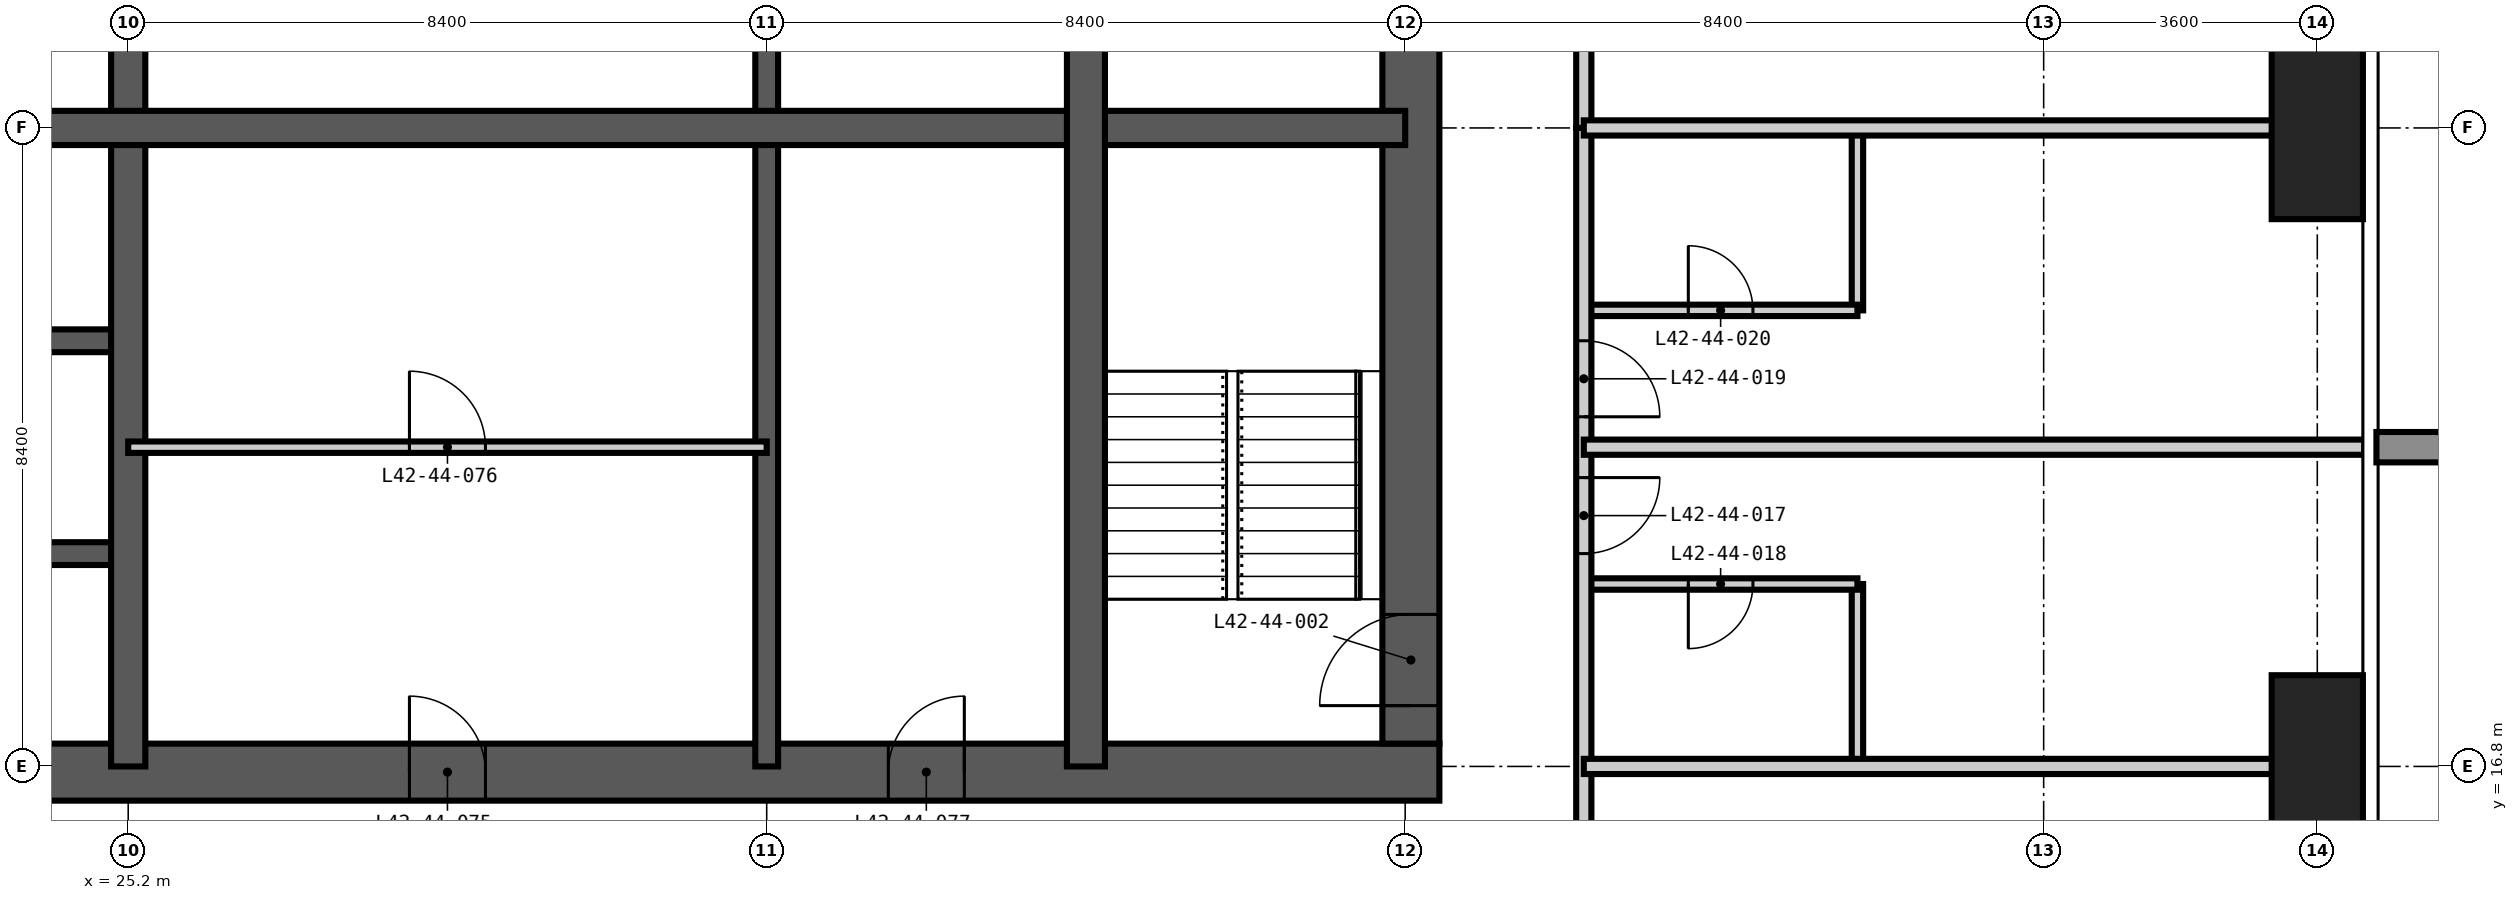
"""IFC4 building model, lengths in metres.
Left out: names, types, materials, properties, quantities, classifications, styles, units other than length and angle.
Written with IfcOpenShell. Run it as: python <this file> out.ifc"""

import sys

from ifc_helpers import new_model, si_unit, direction, frame, frame_2d, origin, origin_2d, place, context, subcontext, project, spatial, rectangle, extrude, element, fill, save


model = new_model("IFC4")
c1 = context("Model", 3, precision=1e-05, world=origin(), true_north=direction((0.0, 1.0)))
c2 = subcontext(c1, "Body", "Model", "MODEL_VIEW")
j1 = project(units=[si_unit("LENGTHUNIT", "METRE"), si_unit("PLANEANGLEUNIT", "RADIAN")], contexts=[c1])
p1 = place(None, origin())
s1 = spatial("IfcSite", under=j1, at=p1, CompositionType="ELEMENT")
p2 = place(p1, origin())
s2 = spatial("IfcBuilding", under=s1, at=p2, CompositionType="ELEMENT")
p3 = place(p2, frame((0.0, 0.0, 166.2)))
s3 = spatial("IfcBuildingStorey", under=s2, at=p3, CompositionType="ELEMENT", Elevation=166.2)
for number, where, z_axis, x_axis in (
    (1, (54.0, 16.8, -0.35), (0.0, 0.0, 1.0), (1.0, 0.0, 0.0)),
    (2, (54.0, 25.2, -0.35), (0.0, 0.0, 1.0), (1.0, 0.0, 0.0)),
):
    element("IfcColumn", number, at=place(p3, frame(where, z_axis=z_axis, x_axis=x_axis)), inside=s3, PredefinedType="COLUMN", context=c2, shape_type="SweptSolid", body=[
        extrude(rectangle(XDim=1.2, YDim=2.4, at=origin_2d()), origin(), (0.0, 0.0, 1.0), 3.6),
    ])
p4 = place(p3, frame((16.35, 16.725, -0.35), z_axis=(0.0, 0.0, 1.0), x_axis=(1.0, 0.0, 0.0)))
e3 = element("IfcWall", 3, at=p4, inside=s3, PredefinedType="SHEAR", context=c2, shape_type="SweptSolid", body=[
    extrude(rectangle(XDim=26.1, YDim=0.75, at=frame_2d((13.05, 0.0))), origin(), (0.0, 0.0, 1.0), 3.6),
])
p5 = place(p4, frame((12.55, 0.0, 0.35)))
e4 = element("IfcOpeningElement", 4, at=p5, cuts=e3, PredefinedType="OPENING", context=c2, shape_type="SweptSolid", body=[
    extrude(rectangle(XDim=1.0, YDim=2.1, at=frame_2d((0.5, 1.05))), frame((0.0, 0.385, 0.0), z_axis=(0.0, -1.0, 0.0), x_axis=(1.0, 0.0, 0.0)), (0.0, 0.0, 1.0), 0.77),
])
p6 = place(p4, frame((18.85, 0.0, 0.35)))
e5 = element("IfcOpeningElement", 5, at=p6, cuts=e3, PredefinedType="OPENING", context=c2, shape_type="SweptSolid", body=[
    extrude(rectangle(XDim=1.0, YDim=2.1, at=frame_2d((0.5, 1.05))), frame((0.0, 0.385, 0.0), z_axis=(0.0, -1.0, 0.0), x_axis=(1.0, 0.0, 0.0)), (0.0, 0.0, 1.0), 0.77),
])
p7 = place(p3, frame((42.075, 17.1, -0.35), z_axis=(0.0, 0.0, 1.0), x_axis=(0.0, 1.0, 0.0)))
e6 = element("IfcWall", 6, at=p7, inside=s3, PredefinedType="SHEAR", context=c2, shape_type="SweptSolid", body=[
    extrude(rectangle(XDim=24.6, YDim=0.75, at=frame_2d((12.3, 0.0))), origin(), (0.0, 0.0, 1.0), 3.6),
])
p8 = place(p7, frame((0.5, 0.0, 0.35)))
e7 = element("IfcOpeningElement", 7, at=p8, cuts=e6, PredefinedType="OPENING", context=c2, shape_type="SweptSolid", body=[
    extrude(rectangle(XDim=1.2, YDim=2.2, at=frame_2d((0.6, 1.1))), frame((0.0, 0.385, 0.0), z_axis=(0.0, -1.0, 0.0), x_axis=(1.0, 0.0, 0.0)), (0.0, 0.0, 1.0), 0.77),
])
p9 = place(p7, frame((11.8, 0.0, 0.35)))
e8 = element("IfcOpeningElement", 8, at=p9, cuts=e6, PredefinedType="OPENING", context=c2, shape_type="SweptSolid", body=[
    extrude(rectangle(XDim=1.0, YDim=2.1, at=frame_2d((0.5, 1.05))), frame((0.0, 0.385, 0.0), z_axis=(0.0, -1.0, 0.0), x_axis=(1.0, 0.0, 0.0)), (0.0, 0.0, 1.0), 0.77),
])
p10 = place(p7, frame((20.2, 0.0, 0.35)))
e9 = element("IfcOpeningElement", 9, at=p10, cuts=e6, PredefinedType="OPENING", context=c2, shape_type="SweptSolid", body=[
    extrude(rectangle(XDim=1.0, YDim=2.1, at=frame_2d((0.5, 1.05))), frame((0.0, 0.385, 0.0), z_axis=(0.0, -1.0, 0.0), x_axis=(1.0, 0.0, 0.0)), (0.0, 0.0, 1.0), 0.77),
])
p11 = place(p3, frame((33.6, 16.8, -0.35), z_axis=(0.0, 0.0, 1.0), x_axis=(0.0, 1.0, 0.0)))
e10 = element("IfcWall", 10, at=p11, inside=s3, PredefinedType="SHEAR", context=c2, shape_type="SweptSolid", body=[
    extrude(rectangle(XDim=25.2, YDim=0.3, at=frame_2d((12.6, 0.0))), origin(), (0.0, 0.0, 1.0), 3.6),
])
p12 = place(p11, frame((22.5, 0.0, 0.35)))
e11 = element("IfcOpeningElement", 11, at=p12, cuts=e10, PredefinedType="OPENING", context=c2, shape_type="SweptSolid", body=[
    extrude(rectangle(XDim=1.2, YDim=2.2, at=frame_2d((0.6, 1.1))), frame((0.0, 0.16, 0.0), z_axis=(0.0, -1.0, 0.0), x_axis=(1.0, 0.0, 0.0)), (0.0, 0.0, 1.0), 0.32),
])
p13 = place(p11, frame((18.3, 0.0, 0.35)))
e12 = element("IfcOpeningElement", 12, at=p13, cuts=e10, PredefinedType="OPENING", context=c2, shape_type="SweptSolid", body=[
    extrude(rectangle(XDim=1.2, YDim=2.2, at=frame_2d((0.6, 1.1))), frame((0.0, 0.16, 0.0), z_axis=(0.0, -1.0, 0.0), x_axis=(1.0, 0.0, 0.0)), (0.0, 0.0, 1.0), 0.32),
])
p14 = place(p11, frame((12.1, 0.0, 0.35)))
e13 = element("IfcOpeningElement", 13, at=p14, cuts=e10, PredefinedType="OPENING", context=c2, shape_type="SweptSolid", body=[
    extrude(rectangle(XDim=1.0, YDim=2.1, at=frame_2d((0.5, 1.05))), frame((0.0, 0.16, 0.0), z_axis=(0.0, -1.0, 0.0), x_axis=(1.0, 0.0, 0.0)), (0.0, 0.0, 1.0), 0.32),
])
p15 = place(p3, frame((16.8, 19.6, -0.35), z_axis=(0.0, 0.0, 1.0), x_axis=(1.0, 0.0, 0.0)))
e14 = element("IfcWall", 14, at=p15, inside=s3, PredefinedType="SHEAR", context=c2, shape_type="SweptSolid", body=[
    extrude(rectangle(XDim=8.4, YDim=0.3, at=frame_2d((4.2, 0.0))), origin(), (0.0, 0.0, 1.0), 3.6),
])
p16 = place(p15, frame((1.6, 0.0, 0.35)))
e15 = element("IfcOpeningElement", 15, at=p16, cuts=e14, PredefinedType="OPENING", context=c2, shape_type="SweptSolid", body=[
    extrude(rectangle(XDim=1.0, YDim=2.1, at=frame_2d((0.5, 1.05))), frame((0.0, 0.16, 0.0), z_axis=(0.0, -1.0, 0.0), x_axis=(1.0, 0.0, 0.0)), (0.0, 0.0, 1.0), 0.32),
])
p17 = place(p15, frame((5.8, 0.0, 0.35)))
e16 = element("IfcOpeningElement", 16, at=p17, cuts=e14, PredefinedType="OPENING", context=c2, shape_type="SweptSolid", body=[
    extrude(rectangle(XDim=1.0, YDim=2.1, at=frame_2d((0.5, 1.05))), frame((0.0, 0.16, 0.0), z_axis=(0.0, -1.0, 0.0), x_axis=(1.0, 0.0, 0.0)), (0.0, 0.0, 1.0), 0.32),
])
p18 = place(p3, frame((16.8, 22.4, -0.35), z_axis=(0.0, 0.0, 1.0), x_axis=(1.0, 0.0, 0.0)))
e17 = element("IfcWall", 17, at=p18, inside=s3, PredefinedType="SHEAR", context=c2, shape_type="SweptSolid", body=[
    extrude(rectangle(XDim=8.4, YDim=0.3, at=frame_2d((4.2, 0.0))), origin(), (0.0, 0.0, 1.0), 3.6),
])
p19 = place(p18, frame((1.6, 0.0, 0.35)))
e18 = element("IfcOpeningElement", 18, at=p19, cuts=e17, PredefinedType="OPENING", context=c2, shape_type="SweptSolid", body=[
    extrude(rectangle(XDim=1.0, YDim=2.1, at=frame_2d((0.5, 1.05))), frame((0.0, 0.16, 0.0), z_axis=(0.0, -1.0, 0.0), x_axis=(1.0, 0.0, 0.0)), (0.0, 0.0, 1.0), 0.32),
])
p20 = place(p18, frame((5.8, 0.0, 0.35)))
e19 = element("IfcOpeningElement", 19, at=p20, cuts=e17, PredefinedType="OPENING", context=c2, shape_type="SweptSolid", body=[
    extrude(rectangle(XDim=1.0, YDim=2.1, at=frame_2d((0.5, 1.05))), frame((0.0, 0.16, 0.0), z_axis=(0.0, -1.0, 0.0), x_axis=(1.0, 0.0, 0.0)), (0.0, 0.0, 1.0), 0.32),
])
for number, where, z_axis, x_axis in (
    (20, (25.2, 16.8, -0.35), (0.0, 0.0, 1.0), (0.0, 1.0, 0.0)),
    (21, (16.8, 25.2, -0.35), (0.0, 0.0, 1.0), (1.0, 0.0, 0.0)),
):
    element("IfcWall", number, at=place(p3, frame(where, z_axis=z_axis, x_axis=x_axis)), inside=s3, PredefinedType="SHEAR", context=c2, shape_type="SweptSolid", body=[
        extrude(rectangle(XDim=25.2, YDim=0.45, at=frame_2d((12.6, 0.0))), origin(), (0.0, 0.0, 1.0), 3.6),
    ])
p21 = place(p3, frame((37.8, 16.8, -0.35), z_axis=(0.0, 0.0, 1.0), x_axis=(0.0, 1.0, 0.0)))
e22 = element("IfcWall", 22, at=p21, inside=s3, PredefinedType="SHEAR", context=c2, shape_type="SweptSolid", body=[
    extrude(rectangle(XDim=11.2, YDim=0.5, at=frame_2d((5.6, 0.0))), origin(), (0.0, 0.0, 1.0), 3.6),
])
for number, where, z_axis, x_axis in (
    (23, (47.95, 16.8, 0.0), (0.0, 0.0, 1.0), (0.0, 1.0, 0.0)),
    (24, (47.95, 22.8, 0.0), (0.0, 0.0, 1.0), (0.0, 1.0, 0.0)),
):
    element("IfcWall", number, at=place(p3, frame(where, z_axis=z_axis, x_axis=x_axis)), inside=s3, PredefinedType="PARTITIONING", context=c2, shape_type="SweptSolid", body=[
        extrude(rectangle(XDim=2.4, YDim=0.15, at=frame_2d((1.2, 0.0))), origin(), (0.0, 0.0, 1.0), 3.25),
    ])
p22 = place(p3, frame((44.35, 19.2, 0.0), z_axis=(0.0, 0.0, 1.0), x_axis=(1.0, 0.0, 0.0)))
e25 = element("IfcWall", 25, at=p22, inside=s3, PredefinedType="PARTITIONING", context=c2, shape_type="SweptSolid", body=[
    extrude(rectangle(XDim=3.6, YDim=0.15, at=frame_2d((1.8, 0.0))), origin(), (0.0, 0.0, 1.0), 3.25),
])
p23 = place(p22, frame((1.375, 0.0, 0.0)))
e26 = element("IfcOpeningElement", 26, at=p23, cuts=e25, PredefinedType="OPENING", context=c2, shape_type="SweptSolid", body=[
    extrude(rectangle(XDim=0.85, YDim=2.1, at=frame_2d((0.425, 1.05))), frame((0.0, 0.085, 0.0), z_axis=(0.0, -1.0, 0.0), x_axis=(1.0, 0.0, 0.0)), (0.0, 0.0, 1.0), 0.17),
])
p24 = place(p3, frame((44.35, 22.8, 0.0), z_axis=(0.0, 0.0, 1.0), x_axis=(1.0, 0.0, 0.0)))
e27 = element("IfcWall", 27, at=p24, inside=s3, PredefinedType="PARTITIONING", context=c2, shape_type="SweptSolid", body=[
    extrude(rectangle(XDim=3.6, YDim=0.15, at=frame_2d((1.8, 0.0))), origin(), (0.0, 0.0, 1.0), 3.25),
])
p25 = place(p24, frame((1.375, 0.0, 0.0)))
e28 = element("IfcOpeningElement", 28, at=p25, cuts=e27, PredefinedType="OPENING", context=c2, shape_type="SweptSolid", body=[
    extrude(rectangle(XDim=0.85, YDim=2.1, at=frame_2d((0.425, 1.05))), frame((0.0, 0.085, 0.0), z_axis=(0.0, -1.0, 0.0), x_axis=(1.0, 0.0, 0.0)), (0.0, 0.0, 1.0), 0.17),
])
p26 = place(p3, frame((44.35, 25.2, 0.0), z_axis=(0.0, 0.0, 1.0), x_axis=(0.0, 1.0, 0.0)))
e29 = element("IfcWall", 29, at=p26, inside=s3, PredefinedType="PARTITIONING", context=c2, shape_type="SweptSolid", body=[
    extrude(rectangle(XDim=8.4, YDim=0.2, at=frame_2d((4.2, 0.0))), origin(), (0.0, 0.0, 1.0), 3.25),
])
p27 = place(p26, frame((3.3, 0.0, 0.0)))
e30 = element("IfcOpeningElement", 30, at=p27, cuts=e29, PredefinedType="OPENING", context=c2, shape_type="SweptSolid", body=[
    extrude(rectangle(XDim=1.8, YDim=2.4, at=frame_2d((0.9, 1.2))), frame((0.0, 0.11, 0.0), z_axis=(0.0, -1.0, 0.0), x_axis=(1.0, 0.0, 0.0)), (0.0, 0.0, 1.0), 0.22),
])
p28 = place(p3, frame((44.35, 25.2, 0.0), z_axis=(0.0, 0.0, 1.0), x_axis=(0.0, -1.0, 0.0)))
e31 = element("IfcWall", 31, at=p28, inside=s3, PredefinedType="PARTITIONING", context=c2, shape_type="SweptSolid", body=[
    extrude(rectangle(XDim=11.95, YDim=0.2, at=frame_2d((5.975, 0.0))), origin(), (0.0, 0.0, 1.0), 3.25),
])
p29 = place(p28, frame((4.6, 0.0, 0.0)))
e32 = element("IfcOpeningElement", 32, at=p29, cuts=e31, PredefinedType="OPENING", context=c2, shape_type="SweptSolid", body=[
    extrude(rectangle(XDim=1.0, YDim=2.2, at=frame_2d((0.5, 1.1))), frame((0.0, 0.11, 0.0), z_axis=(0.0, -1.0, 0.0), x_axis=(1.0, 0.0, 0.0)), (0.0, 0.0, 1.0), 0.22),
])
p30 = place(p28, frame((2.8, 0.0, 0.0)))
e33 = element("IfcOpeningElement", 33, at=p30, cuts=e31, PredefinedType="OPENING", context=c2, shape_type="SweptSolid", body=[
    extrude(rectangle(XDim=1.0, YDim=2.2, at=frame_2d((0.5, 1.1))), frame((0.0, 0.11, 0.0), z_axis=(0.0, -1.0, 0.0), x_axis=(1.0, 0.0, 0.0)), (0.0, 0.0, 1.0), 0.22),
])
p31 = place(p28, frame((9.675, 0.0, 0.0)))
e34 = element("IfcOpeningElement", 34, at=p31, cuts=e31, PredefinedType="OPENING", context=c2, shape_type="SweptSolid", body=[
    extrude(rectangle(XDim=1.0, YDim=2.2, at=frame_2d((0.5, 1.1))), frame((0.0, 0.11, 0.0), z_axis=(0.0, -1.0, 0.0), x_axis=(1.0, 0.0, 0.0)), (0.0, 0.0, 1.0), 0.22),
])
for number, where, z_axis, x_axis in (
    (35, (44.35, 16.8, 0.0), (0.0, 0.0, 1.0), (1.0, 0.0, 0.0)),
    (36, (44.35, 21.0, 0.0), (0.0, 0.0, 1.0), (1.0, 0.0, 0.0)),
    (37, (44.35, 25.2, 0.0), (0.0, 0.0, 1.0), (1.0, 0.0, 0.0)),
):
    element("IfcWall", number, at=place(p3, frame(where, z_axis=z_axis, x_axis=x_axis)), inside=s3, PredefinedType="PARTITIONING", context=c2, shape_type="SweptSolid", body=[
        extrude(rectangle(XDim=10.268, YDim=0.2, at=frame_2d((5.134, 0.0))), origin(), (0.0, 0.0, 1.0), 3.25),
    ])
p32 = place(p3, frame((25.2, 21.0, 0.0), z_axis=(0.0, 0.0, 1.0), x_axis=(1.0, 0.0, 0.0)))
e38 = element("IfcWall", 38, at=p32, inside=s3, PredefinedType="PARTITIONING", context=c2, shape_type="SweptSolid", body=[
    extrude(rectangle(XDim=8.4, YDim=0.15, at=frame_2d((4.2, 0.0))), origin(), (0.0, 0.0, 1.0), 3.25),
])
p33 = place(p32, frame((3.7, 0.0, 0.0)))
e39 = element("IfcOpeningElement", 39, at=p33, cuts=e38, PredefinedType="OPENING", context=c2, shape_type="SweptSolid", body=[
    extrude(rectangle(XDim=1.0, YDim=2.1, at=frame_2d((0.5, 1.05))), frame((0.0, 0.085, 0.0), z_axis=(0.0, -1.0, 0.0), x_axis=(1.0, 0.0, 0.0)), (0.0, 0.0, 1.0), 0.17),
])
p34 = place(p8, origin())
e40 = element("IfcDoor", 40, at=p34, inside=s3, OperationType="SINGLE_SWING_LEFT", PredefinedType="DOOR", context=c2, shape_type="SweptSolid", body=[
    extrude(rectangle(XDim=1.2, YDim=2.2, at=frame_2d((0.6, 1.1))), frame((0.0, 0.025, 0.0), z_axis=(0.0, -1.0, 0.0), x_axis=(1.0, 0.0, 0.0)), (0.0, 0.0, 1.0), 0.05),
])
fill(e7, e40)
p35 = place(p29, origin())
e41 = element("IfcDoor", 41, at=p35, inside=s3, OperationType="SINGLE_SWING_LEFT", PredefinedType="DOOR", context=c2, shape_type="SweptSolid", body=[
    extrude(rectangle(XDim=1.0, YDim=2.2, at=frame_2d((0.5, 1.1))), frame((0.0, 0.025, 0.0), z_axis=(0.0, -1.0, 0.0), x_axis=(1.0, 0.0, 0.0)), (0.0, 0.0, 1.0), 0.05),
])
fill(e32, e41)
p36 = place(p23, frame((0.85, 0.0, 0.0), z_axis=(0.0, 0.0, 1.0), x_axis=(-1.0, 0.0, 0.0)))
e42 = element("IfcDoor", 42, at=p36, inside=s3, OperationType="SINGLE_SWING_RIGHT", PredefinedType="DOOR", context=c2, shape_type="SweptSolid", body=[
    extrude(rectangle(XDim=0.85, YDim=2.1, at=frame_2d((0.425, 1.05))), frame((0.0, 0.025, 0.0), z_axis=(0.0, -1.0, 0.0), x_axis=(1.0, 0.0, 0.0)), (0.0, 0.0, 1.0), 0.05),
])
fill(e26, e42)
p37 = place(p30, origin())
e43 = element("IfcDoor", 43, at=p37, inside=s3, OperationType="SINGLE_SWING_RIGHT", PredefinedType="DOOR", context=c2, shape_type="SweptSolid", body=[
    extrude(rectangle(XDim=1.0, YDim=2.2, at=frame_2d((0.5, 1.1))), frame((0.0, 0.025, 0.0), z_axis=(0.0, -1.0, 0.0), x_axis=(1.0, 0.0, 0.0)), (0.0, 0.0, 1.0), 0.05),
])
fill(e33, e43)
p38 = place(p25, origin())
e44 = element("IfcDoor", 44, at=p38, inside=s3, OperationType="SINGLE_SWING_LEFT", PredefinedType="DOOR", context=c2, shape_type="SweptSolid", body=[
    extrude(rectangle(XDim=0.85, YDim=2.1, at=frame_2d((0.425, 1.05))), frame((0.0, 0.025, 0.0), z_axis=(0.0, -1.0, 0.0), x_axis=(1.0, 0.0, 0.0)), (0.0, 0.0, 1.0), 0.05),
])
fill(e28, e44)
p39 = place(p5, origin())
e45 = element("IfcDoor", 45, at=p39, inside=s3, OperationType="SINGLE_SWING_LEFT", PredefinedType="DOOR", context=c2, shape_type="SweptSolid", body=[
    extrude(rectangle(XDim=1.0, YDim=2.1, at=frame_2d((0.5, 1.05))), frame((0.0, 0.025, 0.0), z_axis=(0.0, -1.0, 0.0), x_axis=(1.0, 0.0, 0.0)), (0.0, 0.0, 1.0), 0.05),
])
fill(e4, e45)
p40 = place(p33, origin())
e46 = element("IfcDoor", 46, at=p40, inside=s3, OperationType="SINGLE_SWING_LEFT", PredefinedType="DOOR", context=c2, shape_type="SweptSolid", body=[
    extrude(rectangle(XDim=1.0, YDim=2.1, at=frame_2d((0.5, 1.05))), frame((0.0, 0.025, 0.0), z_axis=(0.0, -1.0, 0.0), x_axis=(1.0, 0.0, 0.0)), (0.0, 0.0, 1.0), 0.05),
])
fill(e39, e46)
p41 = place(p6, origin())
e47 = element("IfcDoor", 47, at=p41, inside=s3, OperationType="SINGLE_SWING_RIGHT", PredefinedType="DOOR", context=c2, shape_type="SweptSolid", body=[
    extrude(rectangle(XDim=1.0, YDim=2.1, at=frame_2d((0.5, 1.05))), frame((0.0, 0.025, 0.0), z_axis=(0.0, -1.0, 0.0), x_axis=(1.0, 0.0, 0.0)), (0.0, 0.0, 1.0), 0.05),
])
fill(e5, e47)
save(model, sys.argv[1])
